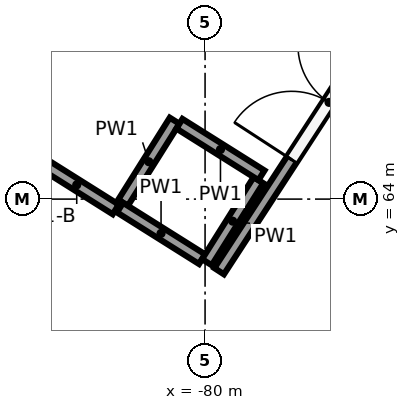
"""IFC4 building model, lengths in metres.
Left out: names, types, materials, properties, quantities, classifications, styles, units other than length and angle.
Written with IfcOpenShell. Run it as: python <this file> out.ifc"""

import sys

from ifc_helpers import new_model, si_unit, direction, frame, frame_2d, origin, origin_2d, place, context, subcontext, project, spatial, rectangle, circle, extrude, element, fill, save


model = new_model("IFC4")
c1 = context("Model", 3, precision=1e-05, world=origin(), true_north=direction((0.0, 1.0)))
c2 = subcontext(c1, "Body", "Model", "MODEL_VIEW")
j1 = project(units=[si_unit("LENGTHUNIT", "METRE"), si_unit("PLANEANGLEUNIT", "RADIAN")], contexts=[c1])
p1 = place(None, origin())
s1 = spatial("IfcSite", under=j1, at=p1, CompositionType="ELEMENT")
p2 = place(p1, origin())
s2 = spatial("IfcBuilding", under=s1, at=p2, CompositionType="ELEMENT")
p3 = place(p2, frame((0.0, 0.0, 18.0)))
s3 = spatial("IfcBuildingStorey", under=s2, at=p3, CompositionType="ELEMENT", Elevation=18.0)
p4 = place(p3, frame((-82.169, 63.034, 0.0), z_axis=(0.0, 0.0, 1.0), x_axis=(1.0, 0.0, 0.0)))
e1 = element("IfcColumn", 1, at=p4, inside=s3, PredefinedType="COLUMN", context=c2, shape_type="SweptSolid", body=[
    extrude(circle(Radius=0.5, at=origin_2d()), origin(), (0.0, 0.0, 1.0), 6.0),
])
p5 = place(p3, frame((-80.711, 60.955, 0.0), z_axis=(0.0, 0.0, 1.0), x_axis=(-0.847794699095, 0.530324568718, 0.0)))
e2 = element("IfcWall", 2, at=p5, inside=s3, PredefinedType="PARTITIONING", context=c2, shape_type="SweptSolid", body=[
    extrude(rectangle(XDim=4.313, YDim=0.15, at=frame_2d((2.156, 0.0))), origin(), (0.0, 0.0, 1.0), 5.6),
])
for number, where, z_axis, x_axis in (
    (3, (-80.401, 65.031, 0.0), (0.0, 0.0, 1.0), (-0.532, -0.847, 0.0)),
    (4, (-81.119, 63.888, 0.0), (0.0, 0.0, 1.0), (0.847, -0.532, 0.0)),
):
    element("IfcWall", number, at=place(p3, frame(where, z_axis=z_axis, x_axis=x_axis)), inside=s3, PredefinedType="PARTITIONING", context=c2, shape_type="SweptSolid", body=[
        extrude(rectangle(XDim=1.275, YDim=0.15, at=frame_2d((0.638, 0.0))), origin(), (0.0, 0.0, 1.0), 5.6),
    ])
for number, where, z_axis, x_axis in (
    (5, (-79.976, 63.17, 0.0), (0.0, 0.0, 1.0), (0.532, 0.847, 0.0)),
    (6, (-79.258, 64.313, 0.0), (0.0, 0.0, 1.0), (-0.847, 0.532, 0.0)),
):
    element("IfcWall", number, at=place(p3, frame(where, z_axis=z_axis, x_axis=x_axis)), inside=s3, PredefinedType="PARTITIONING", context=c2, shape_type="SweptSolid", body=[
        extrude(rectangle(XDim=1.275, YDim=0.15, at=frame_2d((0.637, 0.0))), origin(), (0.0, 0.0, 1.0), 5.6),
    ])
p6 = place(p3, frame((-82.202, 64.51, 0.0), z_axis=(0.0, 0.0, 1.0), x_axis=(0.846706511271, -0.532060225699, 0.0)))
e7 = element("IfcWall", 7, at=p6, inside=s3, PredefinedType="PARTITIONING", context=c2, shape_type="SweptSolid", body=[
    extrude(rectangle(XDim=1.213, YDim=0.15, at=frame_2d((0.606, 0.0))), origin(), (0.0, 0.0, 1.0), 4.5),
])
p7 = place(p3, frame((-79.815, 63.052, 0.0), z_axis=(0.0, 0.0, 1.0), x_axis=(0.545493133091, 0.838115291443, 0.0)))
e8 = element("IfcWall", 8, at=p7, inside=s3, PredefinedType="PARTITIONING", context=c2, shape_type="SweptSolid", body=[
    extrude(rectangle(XDim=13.886, YDim=0.15, at=frame_2d((6.943, 0.0))), origin(), (0.0, 0.0, 1.0), 5.6),
])
p8 = place(p7, frame((4.75, 0.0, 0.0)))
e9 = element("IfcOpeningElement", 9, at=p8, cuts=e8, PredefinedType="OPENING", context=c2, shape_type="SweptSolid", body=[
    extrude(rectangle(XDim=1.8, YDim=2.1, at=frame_2d((0.9, 1.05))), frame((0.0, 0.085, 0.0), z_axis=(0.0, -1.0, 0.0), x_axis=(1.0, 0.0, 0.0)), (0.0, 0.0, 1.0), 0.17),
])
p9 = place(p7, frame((1.75, 0.0, 0.0)))
e10 = element("IfcOpeningElement", 10, at=p9, cuts=e8, PredefinedType="OPENING", context=c2, shape_type="SweptSolid", body=[
    extrude(rectangle(XDim=1.8, YDim=2.1, at=frame_2d((0.9, 1.05))), frame((0.0, 0.085, 0.0), z_axis=(0.0, -1.0, 0.0), x_axis=(1.0, 0.0, 0.0)), (0.0, 0.0, 1.0), 0.17),
])
p10 = place(p7, frame((7.75, 0.0, 0.0)))
e11 = element("IfcOpeningElement", 11, at=p10, cuts=e8, PredefinedType="OPENING", context=c2, shape_type="SweptSolid", body=[
    extrude(rectangle(XDim=1.8, YDim=2.1, at=frame_2d((0.9, 1.05))), frame((0.0, 0.085, 0.0), z_axis=(0.0, -1.0, 0.0), x_axis=(1.0, 0.0, 0.0)), (0.0, 0.0, 1.0), 0.17),
])
p11 = place(p9, origin())
e12 = element("IfcDoor", 12, at=p11, inside=s3, OperationType="DOUBLE_DOOR_SINGLE_SWING", PredefinedType="DOOR", context=c2, shape_type="SweptSolid", body=[
    extrude(rectangle(XDim=1.8, YDim=2.1, at=frame_2d((0.9, 1.05))), frame((0.0, 0.025, 0.0), z_axis=(0.0, -1.0, 0.0), x_axis=(1.0, 0.0, 0.0)), (0.0, 0.0, 1.0), 0.05),
])
fill(e10, e12)
save(model, sys.argv[1])
